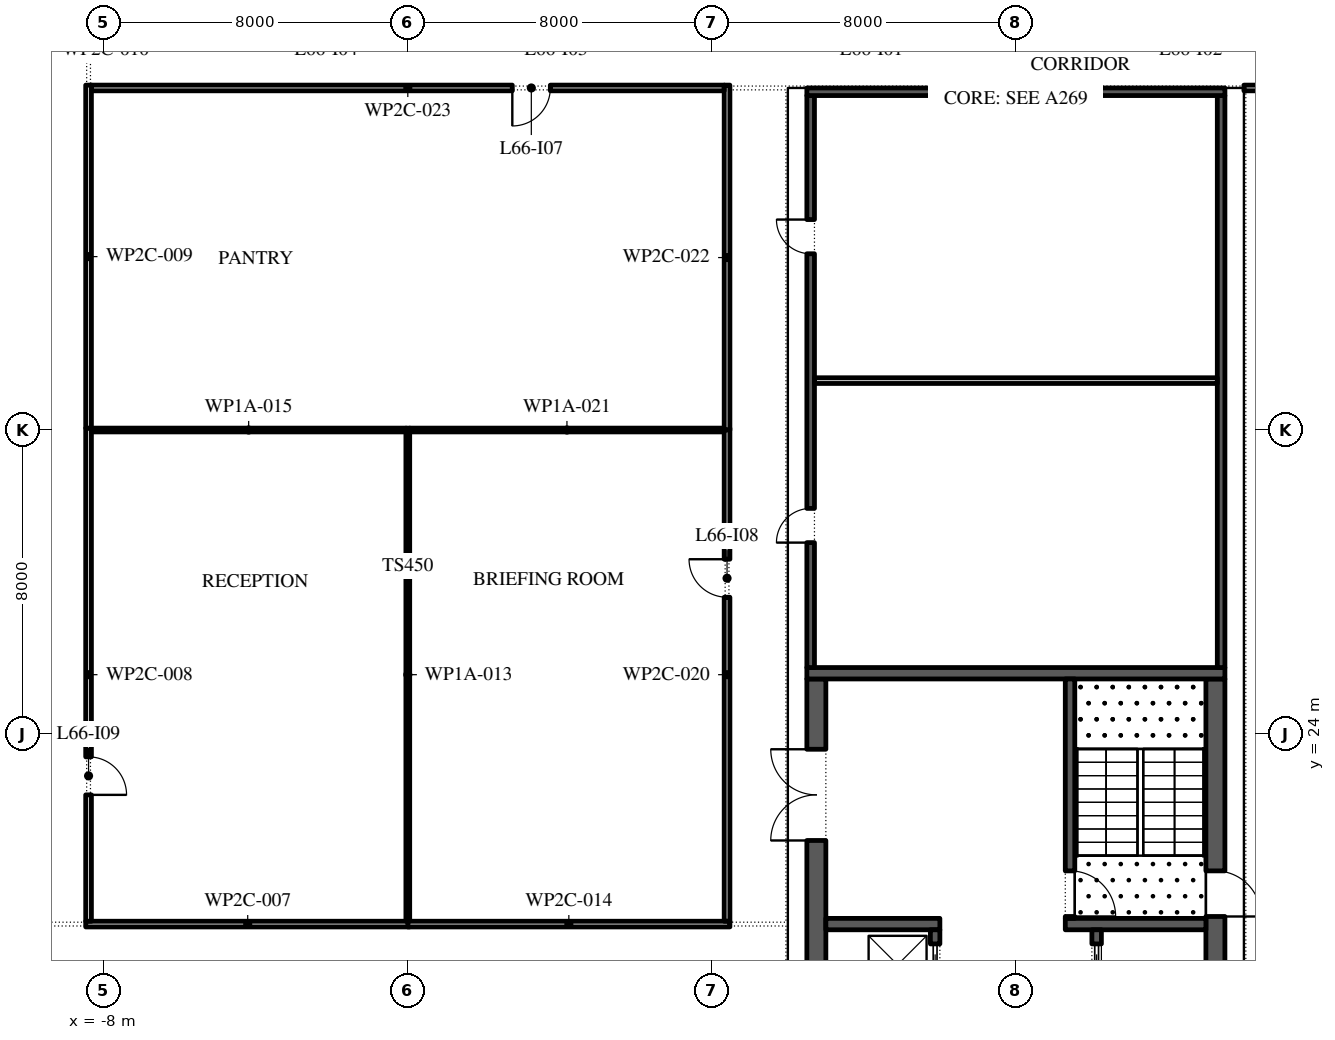
"""IFC4 building model, lengths in metres.
Left out: names, types, materials, properties, quantities, classifications, styles, units other than length and angle.
Written with IfcOpenShell. Run it as: python <this file> out.ifc"""

import sys

from ifc_helpers import new_model, si_unit, direction, frame, frame_2d, origin, place, context, subcontext, project, spatial, rectangle, extrude, element, fill, save


model = new_model("IFC4")
c1 = context("Model", 3, precision=1e-05, world=origin(), true_north=direction((0.0, 1.0)))
c2 = subcontext(c1, "Body", "Model", "MODEL_VIEW")
j1 = project(units=[si_unit("LENGTHUNIT", "METRE"), si_unit("PLANEANGLEUNIT", "RADIAN")], contexts=[c1])
p1 = place(None, origin())
s1 = spatial("IfcSite", under=j1, at=p1, CompositionType="ELEMENT")
p2 = place(p1, origin())
s2 = spatial("IfcBuilding", under=s1, at=p2, CompositionType="ELEMENT")
p3 = place(p2, frame((0.0, 0.0, 303.0)))
s3 = spatial("IfcBuildingStorey", under=s2, at=p3, CompositionType="ELEMENT", Elevation=303.0)
p4 = place(p3, frame((21.25, -2.45, 0.0), z_axis=(0.0, 0.0, 1.0), x_axis=(0.0, 1.0, 0.0)))
e1 = element("IfcWall", 1, at=p4, inside=s3, PredefinedType="SHEAR", context=c2, shape_type="SweptSolid", body=[
    extrude(rectangle(XDim=27.9, YDim=0.5, at=frame_2d((13.95, 0.0))), origin(), (0.0, 0.0, 1.0), 5.8),
])
p5 = place(p4, frame((5.05, 0.0, 0.0)))
e2 = element("IfcOpeningElement", 2, at=p5, cuts=e1, PredefinedType="OPENING", context=c2, shape_type="SweptSolid", body=[
    extrude(rectangle(XDim=1.2, YDim=2.1, at=frame_2d((0.6, 1.05))), frame((0.0, 0.26, 0.0), z_axis=(0.0, -1.0, 0.0), x_axis=(1.0, 0.0, 0.0)), (0.0, 0.0, 1.0), 0.52),
])
p6 = place(p4, frame((21.65, 0.0, 0.0)))
e3 = element("IfcOpeningElement", 3, at=p6, cuts=e1, PredefinedType="OPENING", context=c2, shape_type="SweptSolid", body=[
    extrude(rectangle(XDim=1.2, YDim=2.1, at=frame_2d((0.6, 1.05))), frame((0.0, 0.26, 0.0), z_axis=(0.0, -1.0, 0.0), x_axis=(1.0, 0.0, 0.0)), (0.0, 0.0, 1.0), 0.52),
])
p7 = place(p3, frame((10.75, -2.45, 0.0), z_axis=(0.0, 0.0, 1.0), x_axis=(0.0, 1.0, 0.0)))
e4 = element("IfcWall", 4, at=p7, inside=s3, PredefinedType="SHEAR", context=c2, shape_type="SweptSolid", body=[
    extrude(rectangle(XDim=27.9, YDim=0.5, at=frame_2d((13.95, 0.0))), origin(), (0.0, 0.0, 1.0), 5.8),
])
p8 = place(p7, frame((23.65, 0.0, 0.0)))
e5 = element("IfcOpeningElement", 5, at=p8, cuts=e4, PredefinedType="OPENING", context=c2, shape_type="SweptSolid", body=[
    extrude(rectangle(XDim=2.4, YDim=2.1, at=frame_2d((1.2, 1.05))), frame((0.0, 0.26, 0.0), z_axis=(0.0, -1.0, 0.0), x_axis=(1.0, 0.0, 0.0)), (0.0, 0.0, 1.0), 0.52),
])
p9 = place(p7, frame((1.087, 0.0, 0.0)))
e6 = element("IfcOpeningElement", 6, at=p9, cuts=e4, PredefinedType="OPENING", context=c2, shape_type="SweptSolid", body=[
    extrude(rectangle(XDim=0.9, YDim=2.1, at=frame_2d((0.45, 1.05))), frame((0.0, 0.26, 0.0), z_axis=(0.0, -1.0, 0.0), x_axis=(1.0, 0.0, 0.0)), (0.0, 0.0, 1.0), 0.52),
])
p10 = place(p7, frame((4.262, 0.0, 0.0)))
e7 = element("IfcOpeningElement", 7, at=p10, cuts=e4, PredefinedType="OPENING", context=c2, shape_type="SweptSolid", body=[
    extrude(rectangle(XDim=1.0, YDim=2.1, at=frame_2d((0.5, 1.05))), frame((0.0, 0.26, 0.0), z_axis=(0.0, -1.0, 0.0), x_axis=(1.0, 0.0, 0.0)), (0.0, 0.0, 1.0), 0.52),
])
p11 = place(p3, frame((10.5, 25.6, 0.0), z_axis=(0.0, 0.0, 1.0), x_axis=(1.0, 0.0, 0.0)))
e8 = element("IfcWall", 8, at=p11, inside=s3, PredefinedType="SHEAR", context=c2, shape_type="SweptSolid", body=[
    extrude(rectangle(XDim=11.0, YDim=0.3, at=frame_2d((5.5, 0.0))), origin(), (0.0, 0.0, 1.0), 5.8),
])
p12 = place(p3, frame((17.3, 19.0, 0.0), z_axis=(0.0, 0.0, 1.0), x_axis=(1.0, 0.0, 0.0)))
e9 = element("IfcWall", 9, at=p12, inside=s3, PredefinedType="SHEAR", context=c2, shape_type="SweptSolid", body=[
    extrude(rectangle(XDim=3.7, YDim=0.3, at=frame_2d((1.85, 0.0))), origin(), (0.0, 0.0, 1.0), 5.8),
])
p13 = place(p3, frame((17.425, 19.15, 0.0), z_axis=(0.0, 0.0, 1.0), x_axis=(0.0, 1.0, 0.0)))
e10 = element("IfcWall", 10, at=p13, inside=s3, PredefinedType="SHEAR", context=c2, shape_type="SweptSolid", body=[
    extrude(rectangle(XDim=6.3, YDim=0.25, at=frame_2d((3.15, 0.0))), origin(), (0.0, 0.0, 1.0), 5.8),
])
p14 = place(p13, frame((0.05, 0.0, 0.0)))
e11 = element("IfcOpeningElement", 11, at=p14, cuts=e10, PredefinedType="OPENING", context=c2, shape_type="SweptSolid", body=[
    extrude(rectangle(XDim=1.2, YDim=2.1, at=frame_2d((0.6, 1.05))), frame((0.0, 0.135, 0.0), z_axis=(0.0, -1.0, 0.0), x_axis=(1.0, 0.0, 0.0)), (0.0, 0.0, 1.0), 0.27),
])
p15 = place(p3, frame((18.125, 4.15, 0.0), z_axis=(0.0, 0.0, 1.0), x_axis=(0.0, 1.0, 0.0)))
e12 = element("IfcWall", 12, at=p15, inside=s3, PredefinedType="SHEAR", context=c2, shape_type="SweptSolid", body=[
    extrude(rectangle(XDim=14.7, YDim=0.25, at=frame_2d((7.35, 0.0))), origin(), (0.0, 0.0, 1.0), 5.8),
])
p16 = place(p15, frame((3.246, 0.0, 0.0)))
e13 = element("IfcOpeningElement", 13, at=p16, cuts=e12, PredefinedType="OPENING", context=c2, shape_type="SweptSolid", body=[
    extrude(rectangle(XDim=0.9, YDim=2.1, at=frame_2d((0.45, 1.05))), frame((0.0, 0.135, 0.0), z_axis=(0.0, -1.0, 0.0), x_axis=(1.0, 0.0, 0.0)), (0.0, 0.0, 1.0), 0.27),
])
p17 = place(p15, frame((8.454, 0.0, 0.0)))
e14 = element("IfcOpeningElement", 14, at=p17, cuts=e12, PredefinedType="OPENING", context=c2, shape_type="SweptSolid", body=[
    extrude(rectangle(XDim=0.9, YDim=2.1, at=frame_2d((0.45, 1.05))), frame((0.0, 0.135, 0.0), z_axis=(0.0, -1.0, 0.0), x_axis=(1.0, 0.0, 0.0)), (0.0, 0.0, 1.0), 0.27),
])
p18 = place(p15, frame((0.371, 0.0, 0.0)))
e15 = element("IfcOpeningElement", 15, at=p18, cuts=e12, PredefinedType="OPENING", context=c2, shape_type="SweptSolid", body=[
    extrude(rectangle(XDim=1.1, YDim=2.1, at=frame_2d((0.55, 1.05))), frame((0.0, 0.135, 0.0), z_axis=(0.0, -1.0, 0.0), x_axis=(1.0, 0.0, 0.0)), (0.0, 0.0, 1.0), 0.27),
])
p19 = place(p15, frame((13.229, 0.0, 0.0)))
e16 = element("IfcOpeningElement", 16, at=p19, cuts=e12, PredefinedType="OPENING", context=c2, shape_type="SweptSolid", body=[
    extrude(rectangle(XDim=1.1, YDim=2.1, at=frame_2d((0.55, 1.05))), frame((0.0, 0.135, 0.0), z_axis=(0.0, -1.0, 0.0), x_axis=(1.0, 0.0, 0.0)), (0.0, 0.0, 1.0), 0.27),
])
p20 = place(p3, frame((11.0, 19.0, 0.0), z_axis=(0.0, 0.0, 1.0), x_axis=(1.0, 0.0, 0.0)))
e17 = element("IfcWall", 17, at=p20, inside=s3, PredefinedType="SHEAR", context=c2, shape_type="SweptSolid", body=[
    extrude(rectangle(XDim=3.0, YDim=0.3, at=frame_2d((1.5, 0.0))), origin(), (0.0, 0.0, 1.0), 5.8),
])
p21 = place(p3, frame((13.875, -2.45, 0.0), z_axis=(0.0, 0.0, 1.0), x_axis=(0.0, 1.0, 0.0)))
e18 = element("IfcWall", 18, at=p21, inside=s3, PredefinedType="SHEAR", context=c2, shape_type="SweptSolid", body=[
    extrude(rectangle(XDim=21.3, YDim=0.25, at=frame_2d((10.65, 0.0))), origin(), (0.0, 0.0, 1.0), 5.8),
])
p22 = place(p21, frame((11.357, 0.0, 0.0)))
e19 = element("IfcOpeningElement", 19, at=p22, cuts=e18, PredefinedType="OPENING", context=c2, shape_type="SweptSolid", body=[
    extrude(rectangle(XDim=0.9, YDim=2.1, at=frame_2d((0.45, 1.05))), frame((0.0, 0.135, 0.0), z_axis=(0.0, -1.0, 0.0), x_axis=(1.0, 0.0, 0.0)), (0.0, 0.0, 1.0), 0.27),
])
p23 = place(p21, frame((6.971, 0.0, 0.0)))
e20 = element("IfcOpeningElement", 20, at=p23, cuts=e18, PredefinedType="OPENING", context=c2, shape_type="SweptSolid", body=[
    extrude(rectangle(XDim=1.1, YDim=2.1, at=frame_2d((0.55, 1.05))), frame((0.0, 0.135, 0.0), z_axis=(0.0, -1.0, 0.0), x_axis=(1.0, 0.0, 0.0)), (0.0, 0.0, 1.0), 0.27),
])
p24 = place(p21, frame((15.543, 0.0, 0.0)))
e21 = element("IfcOpeningElement", 21, at=p24, cuts=e18, PredefinedType="OPENING", context=c2, shape_type="SweptSolid", body=[
    extrude(rectangle(XDim=1.1, YDim=2.1, at=frame_2d((0.55, 1.05))), frame((0.0, 0.135, 0.0), z_axis=(0.0, -1.0, 0.0), x_axis=(1.0, 0.0, 0.0)), (0.0, 0.0, 1.0), 0.27),
])
p25 = place(p21, frame((17.686, 0.0, 0.0)))
e22 = element("IfcOpeningElement", 22, at=p25, cuts=e18, PredefinedType="OPENING", context=c2, shape_type="SweptSolid", body=[
    extrude(rectangle(XDim=1.1, YDim=2.1, at=frame_2d((0.55, 1.05))), frame((0.0, 0.135, 0.0), z_axis=(0.0, -1.0, 0.0), x_axis=(1.0, 0.0, 0.0)), (0.0, 0.0, 1.0), 0.27),
])
p26 = place(p21, frame((19.829, 0.0, 0.0)))
e23 = element("IfcOpeningElement", 23, at=p26, cuts=e18, PredefinedType="OPENING", context=c2, shape_type="SweptSolid", body=[
    extrude(rectangle(XDim=1.1, YDim=2.1, at=frame_2d((0.55, 1.05))), frame((0.0, 0.135, 0.0), z_axis=(0.0, -1.0, 0.0), x_axis=(1.0, 0.0, 0.0)), (0.0, 0.0, 1.0), 0.27),
])
p27 = place(p3, frame((21.4, 25.75, 0.0), z_axis=(0.0, 0.0, 1.0), x_axis=(0.0, 1.0, 0.0)))
e24 = element("IfcWall", 24, at=p27, inside=s3, PredefinedType="SHEAR", context=c2, shape_type="SweptSolid", body=[
    extrude(rectangle(XDim=15.05, YDim=0.2, at=frame_2d((7.525, 0.0))), origin(), (0.0, 0.0, 1.0), 5.8),
])
p28 = place(p3, frame((10.6, 25.75, 0.0), z_axis=(0.0, 0.0, 1.0), x_axis=(0.0, 1.0, 0.0)))
e25 = element("IfcWall", 25, at=p28, inside=s3, PredefinedType="SHEAR", context=c2, shape_type="SweptSolid", body=[
    extrude(rectangle(XDim=15.05, YDim=0.2, at=frame_2d((7.525, 0.0))), origin(), (0.0, 0.0, 1.0), 5.8),
])
p29 = place(p28, frame((3.288, 0.0, 0.0)))
e26 = element("IfcOpeningElement", 26, at=p29, cuts=e25, PredefinedType="OPENING", context=c2, shape_type="SweptSolid", body=[
    extrude(rectangle(XDim=0.9, YDim=2.1, at=frame_2d((0.45, 1.05))), frame((0.0, 0.11, 0.0), z_axis=(0.0, -1.0, 0.0), x_axis=(1.0, 0.0, 0.0)), (0.0, 0.0, 1.0), 0.22),
])
p30 = place(p28, frame((10.887, 0.0, 0.0)))
e27 = element("IfcOpeningElement", 27, at=p30, cuts=e25, PredefinedType="OPENING", context=c2, shape_type="SweptSolid", body=[
    extrude(rectangle(XDim=0.9, YDim=2.1, at=frame_2d((0.45, 1.05))), frame((0.0, 0.11, 0.0), z_axis=(0.0, -1.0, 0.0), x_axis=(1.0, 0.0, 0.0)), (0.0, 0.0, 1.0), 0.22),
])
p31 = place(p3, frame((10.5, 40.9, 0.0), z_axis=(0.0, 0.0, 1.0), x_axis=(1.0, 0.0, 0.0)))
e28 = element("IfcWall", 28, at=p31, inside=s3, PredefinedType="SHEAR", context=c2, shape_type="SweptSolid", body=[
    extrude(rectangle(XDim=11.0, YDim=0.2, at=frame_2d((5.5, 0.0))), origin(), (0.0, 0.0, 1.0), 5.8),
])
p32 = place(p3, frame((10.7, 33.3, 0.0), z_axis=(0.0, 0.0, 1.0), x_axis=(1.0, 0.0, 0.0)))
e29 = element("IfcWall", 29, at=p32, inside=s3, PredefinedType="PARTITIONING", context=c2, shape_type="SweptSolid", body=[
    extrude(rectangle(XDim=10.6, YDim=0.15, at=frame_2d((5.3, 0.0))), origin(), (0.0, 0.0, 1.0), 5.8),
])
p33 = place(p3, frame((-8.475, 19.0, 0.0), z_axis=(0.0, 0.0, 1.0), x_axis=(1.0, 0.0, 0.0)))
e30 = element("IfcWall", 30, at=p33, inside=s3, PredefinedType="PARTITIONING", context=c2, shape_type="SweptSolid", body=[
    extrude(rectangle(XDim=8.525, YDim=0.15, at=frame_2d((4.263, 0.0))), origin(), (0.0, 0.0, 1.0), 5.8),
])
p34 = place(p3, frame((-8.4, 32.05, 0.0), z_axis=(0.0, 0.0, 1.0), x_axis=(0.0, -1.0, 0.0)))
e31 = element("IfcWall", 31, at=p34, inside=s3, PredefinedType="PARTITIONING", context=c2, shape_type="SweptSolid", body=[
    extrude(rectangle(XDim=12.975, YDim=0.15, at=frame_2d((6.488, 0.0))), origin(), (0.0, 0.0, 1.0), 5.8),
])
p35 = place(p34, frame((8.65, 0.0, 0.0)))
e32 = element("IfcOpeningElement", 32, at=p35, cuts=e31, PredefinedType="OPENING", context=c2, shape_type="SweptSolid", body=[
    extrude(rectangle(XDim=1.0, YDim=2.1, at=frame_2d((0.5, 1.05))), frame((0.0, 0.085, 0.0), z_axis=(0.0, -1.0, 0.0), x_axis=(1.0, 0.0, 0.0)), (0.0, 0.0, 1.0), 0.17),
])
p36 = place(p3, frame((-8.4, 41.075, 0.0), z_axis=(0.0, 0.0, 1.0), x_axis=(0.0, -1.0, 0.0)))
e33 = element("IfcWall", 33, at=p36, inside=s3, PredefinedType="PARTITIONING", context=c2, shape_type="SweptSolid", body=[
    extrude(rectangle(XDim=9.025, YDim=0.15, at=frame_2d((4.512, 0.0))), origin(), (0.0, 0.0, 1.0), 5.8),
])
p37 = place(p3, frame((0.0, 19.075, 0.0), z_axis=(0.0, 0.0, 1.0), x_axis=(0.0, 1.0, 0.0)))
e34 = element("IfcWall", 34, at=p37, inside=s3, PredefinedType="PARTITIONING", context=c2, shape_type="SweptSolid", body=[
    extrude(rectangle(XDim=12.975, YDim=0.1, at=frame_2d((6.488, 0.0))), origin(), (0.0, 0.0, 1.0), 5.8),
])
p38 = place(p3, frame((0.0, 19.0, 0.0), z_axis=(0.0, 0.0, 1.0), x_axis=(1.0, 0.0, 0.0)))
e35 = element("IfcWall", 35, at=p38, inside=s3, PredefinedType="PARTITIONING", context=c2, shape_type="SweptSolid", body=[
    extrude(rectangle(XDim=8.475, YDim=0.15, at=frame_2d((4.238, 0.0))), origin(), (0.0, 0.0, 1.0), 5.8),
])
p39 = place(p3, frame((-0.05, 32.0, 0.0), z_axis=(0.0, 0.0, 1.0), x_axis=(-1.0, 0.0, 0.0)))
e36 = element("IfcWall", 36, at=p39, inside=s3, PredefinedType="PARTITIONING", context=c2, shape_type="SweptSolid", body=[
    extrude(rectangle(XDim=8.275, YDim=0.1, at=frame_2d((4.137, 0.0))), origin(), (0.0, 0.0, 1.0), 5.8),
])
p40 = place(p3, frame((8.4, 19.075, 0.0), z_axis=(0.0, 0.0, 1.0), x_axis=(0.0, 1.0, 0.0)))
e37 = element("IfcWall", 37, at=p40, inside=s3, PredefinedType="PARTITIONING", context=c2, shape_type="SweptSolid", body=[
    extrude(rectangle(XDim=12.975, YDim=0.15, at=frame_2d((6.488, 0.0))), origin(), (0.0, 0.0, 1.0), 5.8),
])
p41 = place(p40, frame((8.525, 0.0, 0.0)))
e38 = element("IfcOpeningElement", 38, at=p41, cuts=e37, PredefinedType="OPENING", context=c2, shape_type="SweptSolid", body=[
    extrude(rectangle(XDim=1.0, YDim=2.1, at=frame_2d((0.5, 1.05))), frame((0.0, 0.085, 0.0), z_axis=(0.0, -1.0, 0.0), x_axis=(1.0, 0.0, 0.0)), (0.0, 0.0, 1.0), 0.17),
])
p42 = place(p3, frame((8.325, 32.0, 0.0), z_axis=(0.0, 0.0, 1.0), x_axis=(-1.0, 0.0, 0.0)))
e39 = element("IfcWall", 39, at=p42, inside=s3, PredefinedType="PARTITIONING", context=c2, shape_type="SweptSolid", body=[
    extrude(rectangle(XDim=8.275, YDim=0.1, at=frame_2d((4.137, 0.0))), origin(), (0.0, 0.0, 1.0), 5.8),
])
p43 = place(p3, frame((8.4, 32.0, 0.0), z_axis=(0.0, 0.0, 1.0), x_axis=(0.0, 1.0, 0.0)))
e40 = element("IfcWall", 40, at=p43, inside=s3, PredefinedType="PARTITIONING", context=c2, shape_type="SweptSolid", body=[
    extrude(rectangle(XDim=9.075, YDim=0.15, at=frame_2d((4.538, 0.0))), origin(), (0.0, 0.0, 1.0), 5.8),
])
p44 = place(p3, frame((8.325, 41.0, 0.0), z_axis=(0.0, 0.0, 1.0), x_axis=(-1.0, 0.0, 0.0)))
e41 = element("IfcWall", 41, at=p44, inside=s3, PredefinedType="PARTITIONING", context=c2, shape_type="SweptSolid", body=[
    extrude(rectangle(XDim=16.65, YDim=0.15, at=frame_2d((8.325, 0.0))), origin(), (0.0, 0.0, 1.0), 5.8),
])
p45 = place(p44, frame((4.575, 0.0, 0.0)))
e42 = element("IfcOpeningElement", 42, at=p45, cuts=e41, PredefinedType="OPENING", context=c2, shape_type="SweptSolid", body=[
    extrude(rectangle(XDim=1.0, YDim=2.1, at=frame_2d((0.5, 1.05))), frame((0.0, 0.085, 0.0), z_axis=(0.0, -1.0, 0.0), x_axis=(1.0, 0.0, 0.0)), (0.0, 0.0, 1.0), 0.17),
])
p46 = place(p3, frame((26.05, 41.0, 0.0), z_axis=(0.0, 0.0, 1.0), x_axis=(-1.0, 0.0, 0.0)))
e43 = element("IfcWall", 43, at=p46, inside=s3, PredefinedType="PARTITIONING", context=c2, shape_type="SweptSolid", body=[
    extrude(rectangle(XDim=4.05, YDim=0.15, at=frame_2d((2.025, 0.0))), origin(), (0.0, 0.0, 1.0), 5.8),
])
p47 = place(p46, frame((1.9, 0.0, 0.0)))
e44 = element("IfcOpeningElement", 44, at=p47, cuts=e43, PredefinedType="OPENING", context=c2, shape_type="SweptSolid", body=[
    extrude(rectangle(XDim=1.0, YDim=2.1, at=frame_2d((0.5, 1.05))), frame((0.0, 0.085, 0.0), z_axis=(0.0, -1.0, 0.0), x_axis=(1.0, 0.0, 0.0)), (0.0, 0.0, 1.0), 0.17),
])
p48 = place(p19, origin())
e45 = element("IfcDoor", 45, at=p48, inside=s3, OperationType="SLIDING_TO_LEFT", PredefinedType="DOOR", context=c2, shape_type="SweptSolid", body=[
    extrude(rectangle(XDim=1.1, YDim=2.1, at=frame_2d((0.55, 1.05))), frame((0.0, 0.025, 0.0), z_axis=(0.0, -1.0, 0.0), x_axis=(1.0, 0.0, 0.0)), (0.0, 0.0, 1.0), 0.05),
])
fill(e16, e45)
p49 = place(p26, origin())
e46 = element("IfcDoor", 46, at=p49, inside=s3, OperationType="SLIDING_TO_LEFT", PredefinedType="DOOR", context=c2, shape_type="SweptSolid", body=[
    extrude(rectangle(XDim=1.1, YDim=2.1, at=frame_2d((0.55, 1.05))), frame((0.0, 0.025, 0.0), z_axis=(0.0, -1.0, 0.0), x_axis=(1.0, 0.0, 0.0)), (0.0, 0.0, 1.0), 0.05),
])
fill(e23, e46)
p50 = place(p8, origin())
e47 = element("IfcDoor", 47, at=p50, inside=s3, OperationType="DOUBLE_DOOR_SINGLE_SWING", PredefinedType="DOOR", context=c2, shape_type="SweptSolid", body=[
    extrude(rectangle(XDim=2.4, YDim=2.1, at=frame_2d((1.2, 1.05))), frame((0.0, 0.025, 0.0), z_axis=(0.0, -1.0, 0.0), x_axis=(1.0, 0.0, 0.0)), (0.0, 0.0, 1.0), 0.05),
])
fill(e5, e47)
p51 = place(p14, frame((1.2, 0.0, 0.0), z_axis=(0.0, 0.0, 1.0), x_axis=(-1.0, 0.0, 0.0)))
e48 = element("IfcDoor", 48, at=p51, inside=s3, OperationType="SINGLE_SWING_LEFT", PredefinedType="DOOR", context=c2, shape_type="SweptSolid", body=[
    extrude(rectangle(XDim=1.2, YDim=2.1, at=frame_2d((0.6, 1.05))), frame((0.0, 0.025, 0.0), z_axis=(0.0, -1.0, 0.0), x_axis=(1.0, 0.0, 0.0)), (0.0, 0.0, 1.0), 0.05),
])
fill(e11, e48)
p52 = place(p6, frame((1.2, 0.0, 0.0), z_axis=(0.0, 0.0, 1.0), x_axis=(-1.0, 0.0, 0.0)))
e49 = element("IfcDoor", 49, at=p52, inside=s3, OperationType="SINGLE_SWING_LEFT", PredefinedType="DOOR", context=c2, shape_type="SweptSolid", body=[
    extrude(rectangle(XDim=1.2, YDim=2.1, at=frame_2d((0.6, 1.05))), frame((0.0, 0.025, 0.0), z_axis=(0.0, -1.0, 0.0), x_axis=(1.0, 0.0, 0.0)), (0.0, 0.0, 1.0), 0.05),
])
fill(e3, e49)
p53 = place(p29, origin())
e50 = element("IfcDoor", 50, at=p53, inside=s3, OperationType="SINGLE_SWING_RIGHT", PredefinedType="DOOR", context=c2, shape_type="SweptSolid", body=[
    extrude(rectangle(XDim=0.9, YDim=2.1, at=frame_2d((0.45, 1.05))), frame((0.0, -0.05, 0.0), z_axis=(0.0, -1.0, 0.0), x_axis=(1.0, 0.0, 0.0)), (0.0, 0.0, 1.0), 0.05),
])
fill(e26, e50)
p54 = place(p30, origin())
e51 = element("IfcDoor", 51, at=p54, inside=s3, OperationType="SINGLE_SWING_LEFT", PredefinedType="DOOR", context=c2, shape_type="SweptSolid", body=[
    extrude(rectangle(XDim=0.9, YDim=2.1, at=frame_2d((0.45, 1.05))), frame((0.0, -0.05, 0.0), z_axis=(0.0, -1.0, 0.0), x_axis=(1.0, 0.0, 0.0)), (0.0, 0.0, 1.0), 0.05),
])
fill(e27, e51)
p55 = place(p45, origin())
e52 = element("IfcDoor", 52, at=p55, inside=s3, OperationType="SINGLE_SWING_LEFT", PredefinedType="DOOR", context=c2, shape_type="SweptSolid", body=[
    extrude(rectangle(XDim=1.0, YDim=2.1, at=frame_2d((0.5, 1.05))), frame((0.0, 0.025, 0.0), z_axis=(0.0, -1.0, 0.0), x_axis=(1.0, 0.0, 0.0)), (0.0, 0.0, 1.0), 0.05),
])
fill(e42, e52)
p56 = place(p41, origin())
e53 = element("IfcDoor", 53, at=p56, inside=s3, OperationType="SINGLE_SWING_LEFT", PredefinedType="DOOR", context=c2, shape_type="SweptSolid", body=[
    extrude(rectangle(XDim=1.0, YDim=2.1, at=frame_2d((0.5, 1.05))), frame((0.0, 0.025, 0.0), z_axis=(0.0, -1.0, 0.0), x_axis=(1.0, 0.0, 0.0)), (0.0, 0.0, 1.0), 0.05),
])
fill(e38, e53)
p57 = place(p35, origin())
e54 = element("IfcDoor", 54, at=p57, inside=s3, OperationType="SINGLE_SWING_LEFT", PredefinedType="DOOR", context=c2, shape_type="SweptSolid", body=[
    extrude(rectangle(XDim=1.0, YDim=2.1, at=frame_2d((0.5, 1.05))), frame((0.0, 0.025, 0.0), z_axis=(0.0, -1.0, 0.0), x_axis=(1.0, 0.0, 0.0)), (0.0, 0.0, 1.0), 0.05),
])
fill(e32, e54)
save(model, sys.argv[1])
